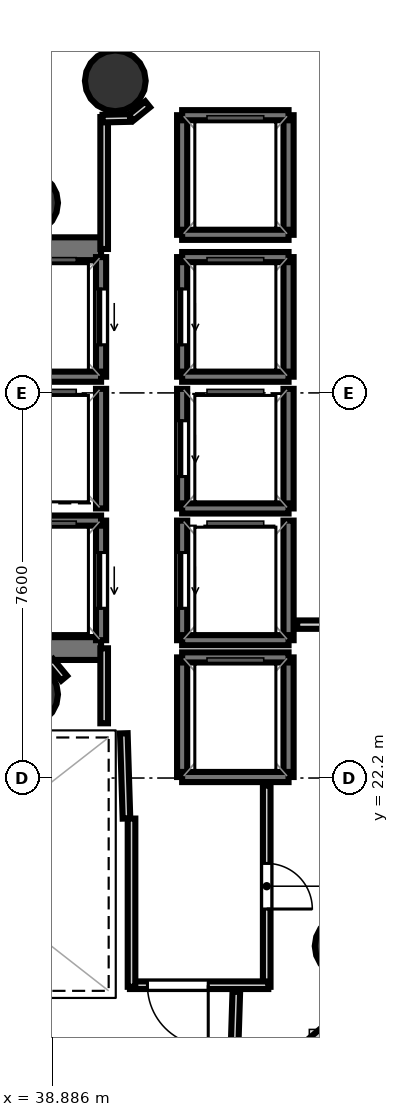
"""IFC4 building model, lengths in metres.
Left out: names, types, materials, properties, quantities, classifications, styles, units other than length and angle.
Written with IfcOpenShell. Run it as: python <this file> out.ifc"""

import sys

from ifc_helpers import new_model, si_unit, direction, frame, frame_2d, origin, origin_2d, place, context, subcontext, project, spatial, rectangle, hollow_circle, extrude, element, fill, save


model = new_model("IFC4")
c1 = context("Model", 3, precision=1e-05, world=origin(), true_north=direction((0.0, 1.0)))
c2 = subcontext(c1, "Body", "Model", "MODEL_VIEW")
j1 = project(units=[si_unit("LENGTHUNIT", "METRE"), si_unit("PLANEANGLEUNIT", "RADIAN")], contexts=[c1])
p1 = place(None, origin())
s1 = spatial("IfcSite", under=j1, at=p1, CompositionType="ELEMENT")
p2 = place(p1, origin())
s2 = spatial("IfcBuilding", under=s1, at=p2, CompositionType="ELEMENT")
p3 = place(p2, frame((0.0, 0.0, 215.1)))
s3 = spatial("IfcBuildingStorey", under=s2, at=p3, CompositionType="ELEMENT", Elevation=215.1)
p4 = place(p3, frame((29.33, 32.645, 0.0), z_axis=(0.0, 0.0, 1.0), x_axis=(1.0, 0.0, 0.0)))
e1 = element("IfcWall", 1, at=p4, inside=s3, PredefinedType="SHEAR", context=c2, shape_type="SweptSolid", body=[
    extrude(rectangle(XDim=10.52, YDim=0.45, at=frame_2d((5.26, 0.0))), origin(), (0.0, 0.0, 1.0), 3.52),
])
p5 = place(p4, frame((0.895, 0.0, 0.0)))
e2 = element("IfcOpeningElement", 2, at=p5, cuts=e1, PredefinedType="OPENING", context=c2, shape_type="SweptSolid", body=[
    extrude(rectangle(XDim=1.25, YDim=2.15, at=frame_2d((0.625, 1.075))), frame((0.0, 0.235, 0.0), z_axis=(0.0, -1.0, 0.0), x_axis=(1.0, 0.0, 0.0)), (0.0, 0.0, 1.0), 0.47),
])
p6 = place(p3, frame((29.33, 24.755, 0.0), z_axis=(0.0, 0.0, 1.0), x_axis=(1.0, 0.0, 0.0)))
e3 = element("IfcWall", 3, at=p6, inside=s3, PredefinedType="SHEAR", context=c2, shape_type="SweptSolid", body=[
    extrude(rectangle(XDim=10.52, YDim=0.45, at=frame_2d((5.26, 0.0))), origin(), (0.0, 0.0, 1.0), 3.52),
])
p7 = place(p6, frame((0.695, 0.0, 0.0)))
e4 = element("IfcOpeningElement", 4, at=p7, cuts=e3, PredefinedType="OPENING", context=c2, shape_type="SweptSolid", body=[
    extrude(rectangle(XDim=1.25, YDim=2.15, at=frame_2d((0.625, 1.075))), frame((0.0, 0.235, 0.0), z_axis=(0.0, -1.0, 0.0), x_axis=(1.0, 0.0, 0.0)), (0.0, 0.0, 1.0), 0.47),
])
for number, where, z_axis, x_axis in (
    (5, (38.4, 33.55, 0.0), (0.0, 0.0, 1.0), (1.0, 0.0, 0.0)),
    (6, (38.4, 23.85, 0.0), (0.0, 0.0, 1.0), (1.0, 0.0, 0.0)),
    (7, (40.131, 35.958, 0.0), (0.0, 0.0, 1.0), (1.0, 0.0, 0.0)),
    (8, (44.667, 18.883, 0.0), (0.0, 0.0, 1.0), (1.0, 0.0, 0.0)),
):
    element("IfcColumn", number, at=place(p3, frame(where, z_axis=z_axis, x_axis=x_axis)), inside=s3, PredefinedType="COLUMN", context=c2, shape_type="SweptSolid", body=[
        extrude(hollow_circle(Radius=0.6, WallThickness=0.03, at=origin_2d()), origin(), (0.0, 0.0, 1.0), 3.7),
    ])
p8 = place(p3, frame((39.85, 30.12, 0.0), z_axis=(0.0, 0.0, 1.0), x_axis=(0.0, 1.0, 0.0)))
e9 = element("IfcWall", 9, at=p8, inside=s3, PredefinedType="SOLIDWALL", context=c2, shape_type="SweptSolid", body=[
    extrude(rectangle(XDim=2.36, YDim=0.2, at=frame_2d((1.18, 0.0))), origin(), (0.0, 0.0, 1.0), 3.52),
])
p9 = place(p8, frame((0.63, 0.0, 0.0)))
e10 = element("IfcOpeningElement", 10, at=p9, cuts=e9, PredefinedType="OPENING", context=c2, shape_type="SweptSolid", body=[
    extrude(rectangle(XDim=1.1, YDim=2.15, at=frame_2d((0.55, 1.075))), frame((0.0, 0.11, 0.0), z_axis=(0.0, -1.0, 0.0), x_axis=(1.0, 0.0, 0.0)), (0.0, 0.0, 1.0), 0.22),
])
p10 = place(p3, frame((37.75, 30.12, 0.0), z_axis=(0.0, 0.0, 1.0), x_axis=(1.0, 0.0, 0.0)))
e11 = element("IfcWall", 11, at=p10, inside=s3, PredefinedType="SOLIDWALL", context=c2, shape_type="SweptSolid", body=[
    extrude(rectangle(XDim=2.1, YDim=0.2, at=frame_2d((1.05, 0.0))), origin(), (0.0, 0.0, 1.0), 3.52),
])
p11 = place(p3, frame((39.85, 24.92, 0.0), z_axis=(0.0, 0.0, 1.0), x_axis=(0.0, 1.0, 0.0)))
e12 = element("IfcWall", 12, at=p11, inside=s3, PredefinedType="SOLIDWALL", context=c2, shape_type="SweptSolid", body=[
    extrude(rectangle(XDim=2.36, YDim=0.2, at=frame_2d((1.18, 0.0))), origin(), (0.0, 0.0, 1.0), 3.52),
])
p12 = place(p11, frame((0.63, 0.0, 0.0)))
e13 = element("IfcOpeningElement", 13, at=p12, cuts=e12, PredefinedType="OPENING", context=c2, shape_type="SweptSolid", body=[
    extrude(rectangle(XDim=1.1, YDim=2.15, at=frame_2d((0.55, 1.075))), frame((0.0, 0.11, 0.0), z_axis=(0.0, -1.0, 0.0), x_axis=(1.0, 0.0, 0.0)), (0.0, 0.0, 1.0), 0.22),
])
p13 = place(p3, frame((37.75, 27.28, 0.0), z_axis=(0.0, 0.0, 1.0), x_axis=(1.0, 0.0, 0.0)))
e14 = element("IfcWall", 14, at=p13, inside=s3, PredefinedType="SOLIDWALL", context=c2, shape_type="SweptSolid", body=[
    extrude(rectangle(XDim=2.1, YDim=0.2, at=frame_2d((1.05, 0.0))), origin(), (0.0, 0.0, 1.0), 3.52),
])
p14 = place(p3, frame((43.55, 30.12, 0.0), z_axis=(0.0, 0.0, 1.0), x_axis=(0.0, 1.0, 0.0)))
e15 = element("IfcWall", 15, at=p14, inside=s3, PredefinedType="SOLIDWALL", context=c2, shape_type="SweptSolid", body=[
    extrude(rectangle(XDim=2.36, YDim=0.2, at=frame_2d((1.18, 0.0))), origin(), (0.0, 0.0, 1.0), 3.52),
])
p15 = place(p3, frame((41.45, 30.12, 0.0), z_axis=(0.0, 0.0, 1.0), x_axis=(0.0, 1.0, 0.0)))
e16 = element("IfcWall", 16, at=p15, inside=s3, PredefinedType="SOLIDWALL", context=c2, shape_type="SweptSolid", body=[
    extrude(rectangle(XDim=2.36, YDim=0.2, at=frame_2d((1.18, 0.0))), origin(), (0.0, 0.0, 1.0), 3.52),
])
p16 = place(p15, frame((0.63, 0.0, 0.0)))
e17 = element("IfcOpeningElement", 17, at=p16, cuts=e16, PredefinedType="OPENING", context=c2, shape_type="SweptSolid", body=[
    extrude(rectangle(XDim=1.1, YDim=2.15, at=frame_2d((0.55, 1.075))), frame((0.0, 0.11, 0.0), z_axis=(0.0, -1.0, 0.0), x_axis=(1.0, 0.0, 0.0)), (0.0, 0.0, 1.0), 0.22),
])
for number, where, z_axis, x_axis in (
    (18, (41.45, 32.48, 0.0), (0.0, 0.0, 1.0), (1.0, 0.0, 0.0)),
    (19, (41.45, 30.12, 0.0), (0.0, 0.0, 1.0), (1.0, 0.0, 0.0)),
):
    element("IfcWall", number, at=place(p3, frame(where, z_axis=z_axis, x_axis=x_axis)), inside=s3, PredefinedType="SOLIDWALL", context=c2, shape_type="SweptSolid", body=[
        extrude(rectangle(XDim=2.1, YDim=0.2, at=frame_2d((1.05, 0.0))), origin(), (0.0, 0.0, 1.0), 3.52),
    ])
p17 = place(p3, frame((43.55, 27.52, 0.0), z_axis=(0.0, 0.0, 1.0), x_axis=(0.0, 1.0, 0.0)))
e20 = element("IfcWall", 20, at=p17, inside=s3, PredefinedType="SOLIDWALL", context=c2, shape_type="SweptSolid", body=[
    extrude(rectangle(XDim=2.36, YDim=0.2, at=frame_2d((1.18, 0.0))), origin(), (0.0, 0.0, 1.0), 3.52),
])
p18 = place(p3, frame((41.45, 27.52, 0.0), z_axis=(0.0, 0.0, 1.0), x_axis=(0.0, 1.0, 0.0)))
e21 = element("IfcWall", 21, at=p18, inside=s3, PredefinedType="SOLIDWALL", context=c2, shape_type="SweptSolid", body=[
    extrude(rectangle(XDim=2.36, YDim=0.2, at=frame_2d((1.18, 0.0))), origin(), (0.0, 0.0, 1.0), 3.52),
])
p19 = place(p18, frame((0.63, 0.0, 0.0)))
e22 = element("IfcOpeningElement", 22, at=p19, cuts=e21, PredefinedType="OPENING", context=c2, shape_type="SweptSolid", body=[
    extrude(rectangle(XDim=1.1, YDim=2.15, at=frame_2d((0.55, 1.075))), frame((0.0, 0.11, 0.0), z_axis=(0.0, -1.0, 0.0), x_axis=(1.0, 0.0, 0.0)), (0.0, 0.0, 1.0), 0.22),
])
p20 = place(p3, frame((41.45, 27.52, 0.0), z_axis=(0.0, 0.0, 1.0), x_axis=(1.0, 0.0, 0.0)))
e23 = element("IfcWall", 23, at=p20, inside=s3, PredefinedType="SOLIDWALL", context=c2, shape_type="SweptSolid", body=[
    extrude(rectangle(XDim=2.1, YDim=0.2, at=frame_2d((1.05, 0.0))), origin(), (0.0, 0.0, 1.0), 3.52),
])
p21 = place(p3, frame((43.55, 24.92, 0.0), z_axis=(0.0, 0.0, 1.0), x_axis=(0.0, 1.0, 0.0)))
e24 = element("IfcWall", 24, at=p21, inside=s3, PredefinedType="SOLIDWALL", context=c2, shape_type="SweptSolid", body=[
    extrude(rectangle(XDim=2.36, YDim=0.2, at=frame_2d((1.18, 0.0))), origin(), (0.0, 0.0, 1.0), 3.52),
])
p22 = place(p3, frame((41.45, 24.92, 0.0), z_axis=(0.0, 0.0, 1.0), x_axis=(0.0, 1.0, 0.0)))
e25 = element("IfcWall", 25, at=p22, inside=s3, PredefinedType="SOLIDWALL", context=c2, shape_type="SweptSolid", body=[
    extrude(rectangle(XDim=2.36, YDim=0.2, at=frame_2d((1.18, 0.0))), origin(), (0.0, 0.0, 1.0), 3.52),
])
p23 = place(p22, frame((0.63, 0.0, 0.0)))
e26 = element("IfcOpeningElement", 26, at=p23, cuts=e25, PredefinedType="OPENING", context=c2, shape_type="SweptSolid", body=[
    extrude(rectangle(XDim=1.1, YDim=2.15, at=frame_2d((0.55, 1.075))), frame((0.0, 0.11, 0.0), z_axis=(0.0, -1.0, 0.0), x_axis=(1.0, 0.0, 0.0)), (0.0, 0.0, 1.0), 0.22),
])
p24 = place(p3, frame((41.45, 24.92, 0.0), z_axis=(0.0, 0.0, 1.0), x_axis=(1.0, 0.0, 0.0)))
e27 = element("IfcWall", 27, at=p24, inside=s3, PredefinedType="SOLIDWALL", context=c2, shape_type="SweptSolid", body=[
    extrude(rectangle(XDim=2.1, YDim=0.2, at=frame_2d((1.05, 0.0))), origin(), (0.0, 0.0, 1.0), 3.52),
])
p25 = place(p3, frame((39.85, 27.52, 0.0), z_axis=(0.0, 0.0, 1.0), x_axis=(0.0, 1.0, 0.0)))
e28 = element("IfcWall", 28, at=p25, inside=s3, PredefinedType="SOLIDWALL", context=c2, shape_type="SweptSolid", body=[
    extrude(rectangle(XDim=2.36, YDim=0.2, at=frame_2d((1.18, 0.0))), origin(), (0.0, 0.0, 1.0), 3.52),
])
for number, where, z_axis, x_axis in (
    (29, (43.55, 22.22, 0.0), (0.0, 0.0, 1.0), (0.0, 1.0, 0.0)),
    (30, (41.45, 22.22, 0.0), (0.0, 0.0, 1.0), (0.0, 1.0, 0.0)),
):
    element("IfcWall", number, at=place(p3, frame(where, z_axis=z_axis, x_axis=x_axis)), inside=s3, PredefinedType="SOLIDWALL", context=c2, shape_type="SweptSolid", body=[
        extrude(rectangle(XDim=2.36, YDim=0.2, at=frame_2d((1.18, 0.0))), origin(), (0.0, 0.0, 1.0), 3.52),
    ])
for number, where, z_axis, x_axis in (
    (31, (41.45, 24.58, 0.0), (0.0, 0.0, 1.0), (1.0, 0.0, 0.0)),
    (32, (41.45, 22.22, 0.0), (0.0, 0.0, 1.0), (1.0, 0.0, 0.0)),
):
    element("IfcWall", number, at=place(p3, frame(where, z_axis=z_axis, x_axis=x_axis)), inside=s3, PredefinedType="SOLIDWALL", context=c2, shape_type="SweptSolid", body=[
        extrude(rectangle(XDim=2.1, YDim=0.2, at=frame_2d((1.05, 0.0))), origin(), (0.0, 0.0, 1.0), 3.52),
    ])
for number, where, z_axis, x_axis in (
    (33, (43.55, 32.92, 0.0), (0.0, 0.0, 1.0), (0.0, 1.0, 0.0)),
    (34, (41.45, 32.92, 0.0), (0.0, 0.0, 1.0), (0.0, 1.0, 0.0)),
):
    element("IfcWall", number, at=place(p3, frame(where, z_axis=z_axis, x_axis=x_axis)), inside=s3, PredefinedType="SOLIDWALL", context=c2, shape_type="SweptSolid", body=[
        extrude(rectangle(XDim=2.36, YDim=0.2, at=frame_2d((1.18, 0.0))), origin(), (0.0, 0.0, 1.0), 3.52),
    ])
for number, where, z_axis, x_axis in (
    (35, (41.45, 35.28, 0.0), (0.0, 0.0, 1.0), (1.0, 0.0, 0.0)),
    (36, (41.45, 32.92, 0.0), (0.0, 0.0, 1.0), (1.0, 0.0, 0.0)),
):
    element("IfcWall", number, at=place(p3, frame(where, z_axis=z_axis, x_axis=x_axis)), inside=s3, PredefinedType="SOLIDWALL", context=c2, shape_type="SweptSolid", body=[
        extrude(rectangle(XDim=2.1, YDim=0.2, at=frame_2d((1.05, 0.0))), origin(), (0.0, 0.0, 1.0), 3.52),
    ])
p26 = place(p3, frame((40.351, 21.401, 0.0), z_axis=(0.0, 0.0, 1.0), x_axis=(-0.031058045979, 0.999517582527, 0.0)))
e37 = element("IfcWall", 37, at=p26, inside=s3, PredefinedType="PARTITIONING", context=c2, shape_type="SweptSolid", body=[
    extrude(rectangle(XDim=1.682, YDim=0.15, at=frame_2d((0.841, 0.0))), origin(), (0.0, 0.0, 1.0), 2.84),
])
p27 = place(p3, frame((39.911, 23.28, 0.0), z_axis=(0.0, 0.0, 1.0), x_axis=(0.0, 1.0, 0.0)))
e38 = element("IfcWall", 38, at=p27, inside=s3, PredefinedType="PARTITIONING", context=c2, shape_type="SweptSolid", body=[
    extrude(rectangle(XDim=1.48, YDim=0.15, at=frame_2d((0.74, 0.0))), origin(), (0.0, 0.0, 1.0), 2.84),
])
p28 = place(p3, frame((39.911, 32.64, 0.0), z_axis=(0.0, 0.0, 1.0), x_axis=(0.0, 1.0, 0.0)))
e39 = element("IfcWall", 39, at=p28, inside=s3, PredefinedType="PARTITIONING", context=c2, shape_type="SweptSolid", body=[
    extrude(rectangle(XDim=2.604, YDim=0.15, at=frame_2d((1.302, 0.0))), origin(), (0.0, 0.0, 1.0), 2.84),
])
p29 = place(p3, frame((39.881, 35.213, 0.0), z_axis=(0.0, 0.0, 1.0), x_axis=(0.999756500784, 0.02206669754, 0.0)))
e40 = element("IfcWall", 40, at=p29, inside=s3, PredefinedType="PARTITIONING", context=c2, shape_type="SweptSolid", body=[
    extrude(rectangle(XDim=0.542, YDim=0.15, at=frame_2d((0.271, 0.0))), origin(), (0.0, 0.0, 1.0), 2.84),
])
p30 = place(p3, frame((40.441, 35.232, 0.0), z_axis=(0.0, 0.0, 1.0), x_axis=(0.778714564707, 0.627378376033, 0.0)))
e41 = element("IfcWall", 41, at=p30, inside=s3, PredefinedType="PARTITIONING", context=c2, shape_type="SweptSolid", body=[
    extrude(rectangle(XDim=0.421, YDim=0.15, at=frame_2d((0.21, 0.0))), origin(), (0.0, 0.0, 1.0), 2.84),
])
p31 = place(p3, frame((43.119, 22.05, 0.0), z_axis=(0.0, 0.0, 1.0), x_axis=(0.0, -1.0, 0.0)))
e42 = element("IfcWall", 42, at=p31, inside=s3, PredefinedType="PARTITIONING", context=c2, shape_type="SweptSolid", body=[
    extrude(rectangle(XDim=3.97, YDim=0.15, at=frame_2d((1.985, 0.0))), origin(), (0.0, 0.0, 1.0), 2.84),
])
p32 = place(p31, frame((1.535, 0.0, 0.0)))
e43 = element("IfcOpeningElement", 43, at=p32, cuts=e42, PredefinedType="OPENING", context=c2, shape_type="SweptSolid", body=[
    extrude(rectangle(XDim=0.9, YDim=2.1, at=frame_2d((0.45, 1.05))), frame((0.0, 0.085, 0.0), z_axis=(0.0, -1.0, 0.0), x_axis=(1.0, 0.0, 0.0)), (0.0, 0.0, 1.0), 0.17),
])
p33 = place(p3, frame((43.15, 18.111, 0.0), z_axis=(0.0, 0.0, 1.0), x_axis=(-1.0, 0.0, 0.0)))
e44 = element("IfcWall", 44, at=p33, inside=s3, PredefinedType="PARTITIONING", context=c2, shape_type="SweptSolid", body=[
    extrude(rectangle(XDim=2.73, YDim=0.15, at=frame_2d((1.365, 0.0))), origin(), (0.0, 0.0, 1.0), 2.84),
])
p34 = place(p33, frame((1.185, 0.0, 0.0)))
e45 = element("IfcOpeningElement", 45, at=p34, cuts=e44, PredefinedType="OPENING", context=c2, shape_type="SweptSolid", body=[
    extrude(rectangle(XDim=1.2, YDim=2.15, at=frame_2d((0.6, 1.075))), frame((0.0, 0.085, 0.0), z_axis=(0.0, -1.0, 0.0), x_axis=(1.0, 0.0, 0.0)), (0.0, 0.0, 1.0), 0.17),
])
p35 = place(p3, frame((40.451, 18.08, 0.0), z_axis=(0.0, 0.0, 1.0), x_axis=(0.0, 1.0, 0.0)))
e46 = element("IfcWall", 46, at=p35, inside=s3, PredefinedType="PARTITIONING", context=c2, shape_type="SweptSolid", body=[
    extrude(rectangle(XDim=3.32, YDim=0.15, at=frame_2d((1.66, 0.0))), origin(), (0.0, 0.0, 1.0), 2.84),
])
p36 = place(p3, frame((39.121, 24.17, 0.0), z_axis=(0.0, 0.0, 1.0), x_axis=(-0.638008265708, 0.770029514296, 0.0)))
e47 = element("IfcWall", 47, at=p36, inside=s3, PredefinedType="PARTITIONING", context=c2, shape_type="SweptSolid", body=[
    extrude(rectangle(XDim=0.431, YDim=0.15, at=frame_2d((0.215, 0.0))), origin(), (0.0, 0.0, 1.0), 2.84),
])
p37 = place(p3, frame((42.519, 17.981, 0.0), z_axis=(0.0, 0.0, 1.0), x_axis=(-0.031677304437, -0.999498148264, 0.0)))
e48 = element("IfcWall", 48, at=p37, inside=s3, PredefinedType="PARTITIONING", context=c2, shape_type="SweptSolid", body=[
    extrude(rectangle(XDim=3.083, YDim=0.15, at=frame_2d((1.542, 0.0))), origin(), (0.0, 0.0, 1.0), 2.84),
])
p38 = place(p3, frame((43.72, 25.227, 0.0), z_axis=(0.0, 0.0, 1.0), x_axis=(1.0, 0.0, 0.0)))
e49 = element("IfcWall", 49, at=p38, inside=s3, PredefinedType="PLUMBINGWALL", context=c2, shape_type="SweptSolid", body=[
    extrude(rectangle(XDim=10.785, YDim=0.165, at=frame_2d((5.392, 0.0))), origin(), (0.0, 0.0, 1.0), 2.84),
])
p39 = place(p38, frame((4.925, 0.0, 0.0)))
e50 = element("IfcOpeningElement", 50, at=p39, cuts=e49, PredefinedType="OPENING", context=c2, shape_type="SweptSolid", body=[
    extrude(rectangle(XDim=0.9, YDim=2.1, at=frame_2d((0.45, 1.05))), frame((0.0, 0.093, 0.0), z_axis=(0.0, -1.0, 0.0), x_axis=(1.0, 0.0, 0.0)), (0.0, 0.0, 1.0), 0.185),
])
p40 = place(p3, frame((53.7, 25.281, 0.0), z_axis=(0.0, 0.0, 1.0), x_axis=(-0.760261052986, -0.64961768088, 0.0)))
e51 = element("IfcWall", 51, at=p40, inside=s3, PredefinedType="PLUMBINGWALL", context=c2, shape_type="SweptSolid", body=[
    extrude(rectangle(XDim=14.588, YDim=0.165, at=frame_2d((7.294, 0.0))), origin(), (0.0, 0.0, 1.0), 2.84),
])
p41 = place(p9, origin())
e52 = element("IfcDoor", 52, at=p41, inside=s3, OperationType="SLIDING_TO_LEFT", PredefinedType="DOOR", context=c2, shape_type="SweptSolid", body=[
    extrude(rectangle(XDim=1.1, YDim=2.15, at=frame_2d((0.55, 1.075))), frame((0.0, 0.025, 0.0), z_axis=(0.0, -1.0, 0.0), x_axis=(1.0, 0.0, 0.0)), (0.0, 0.0, 1.0), 0.05),
])
fill(e10, e52)
p42 = place(p12, origin())
e53 = element("IfcDoor", 53, at=p42, inside=s3, OperationType="SLIDING_TO_LEFT", PredefinedType="DOOR", context=c2, shape_type="SweptSolid", body=[
    extrude(rectangle(XDim=1.1, YDim=2.15, at=frame_2d((0.55, 1.075))), frame((0.0, 0.025, 0.0), z_axis=(0.0, -1.0, 0.0), x_axis=(1.0, 0.0, 0.0)), (0.0, 0.0, 1.0), 0.05),
])
fill(e13, e53)
p43 = place(p16, origin())
e54 = element("IfcDoor", 54, at=p43, inside=s3, OperationType="SLIDING_TO_LEFT", PredefinedType="DOOR", context=c2, shape_type="SweptSolid", body=[
    extrude(rectangle(XDim=1.1, YDim=2.15, at=frame_2d((0.55, 1.075))), frame((0.0, 0.025, 0.0), z_axis=(0.0, -1.0, 0.0), x_axis=(1.0, 0.0, 0.0)), (0.0, 0.0, 1.0), 0.05),
])
fill(e17, e54)
p44 = place(p19, origin())
e55 = element("IfcDoor", 55, at=p44, inside=s3, OperationType="SLIDING_TO_LEFT", PredefinedType="DOOR", context=c2, shape_type="SweptSolid", body=[
    extrude(rectangle(XDim=1.1, YDim=2.15, at=frame_2d((0.55, 1.075))), frame((0.0, 0.025, 0.0), z_axis=(0.0, -1.0, 0.0), x_axis=(1.0, 0.0, 0.0)), (0.0, 0.0, 1.0), 0.05),
])
fill(e22, e55)
p45 = place(p23, origin())
e56 = element("IfcDoor", 56, at=p45, inside=s3, OperationType="SLIDING_TO_LEFT", PredefinedType="DOOR", context=c2, shape_type="SweptSolid", body=[
    extrude(rectangle(XDim=1.1, YDim=2.15, at=frame_2d((0.55, 1.075))), frame((0.0, 0.025, 0.0), z_axis=(0.0, -1.0, 0.0), x_axis=(1.0, 0.0, 0.0)), (0.0, 0.0, 1.0), 0.05),
])
fill(e26, e56)
p46 = place(p34, origin())
e57 = element("IfcDoor", 57, at=p46, inside=s3, OperationType="SINGLE_SWING_LEFT", PredefinedType="DOOR", context=c2, shape_type="SweptSolid", body=[
    extrude(rectangle(XDim=1.2, YDim=2.15, at=frame_2d((0.6, 1.075))), frame((0.0, 0.025, 0.0), z_axis=(0.0, -1.0, 0.0), x_axis=(1.0, 0.0, 0.0)), (0.0, 0.0, 1.0), 0.05),
])
fill(e45, e57)
p47 = place(p32, origin())
e58 = element("IfcDoor", 58, at=p47, inside=s3, OperationType="SINGLE_SWING_RIGHT", PredefinedType="DOOR", context=c2, shape_type="SweptSolid", body=[
    extrude(rectangle(XDim=0.9, YDim=2.1, at=frame_2d((0.45, 1.05))), frame((0.0, 0.025, 0.0), z_axis=(0.0, -1.0, 0.0), x_axis=(1.0, 0.0, 0.0)), (0.0, 0.0, 1.0), 0.05),
])
fill(e43, e58)
save(model, sys.argv[1])
